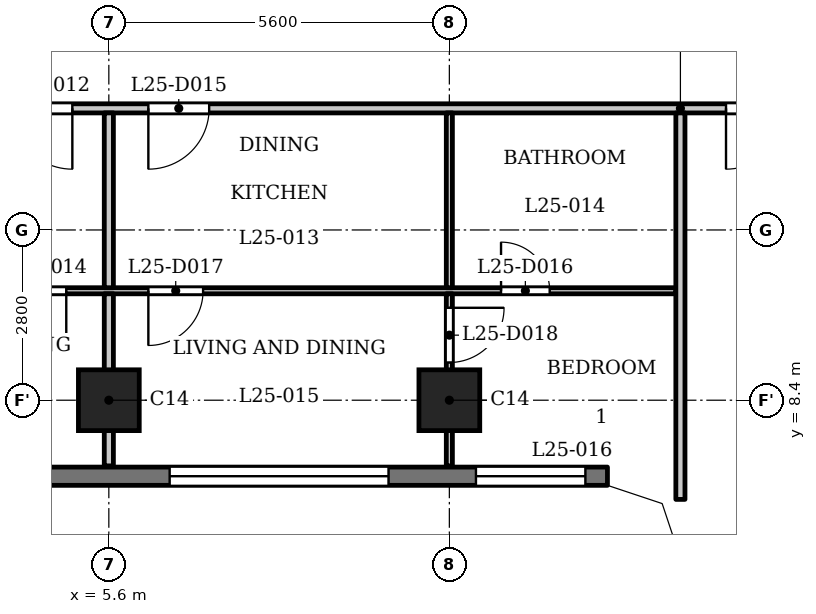
"""IFC4 building model, lengths in metres.
Left out: names, types, materials, properties, quantities, classifications, styles, units other than length and angle.
Written with IfcOpenShell. Run it as: python <this file> out.ifc"""

import sys

from ifc_helpers import new_model, si_unit, direction, frame, frame_2d, origin, origin_2d, place, context, subcontext, project, spatial, polyline, rectangle, outline, extrude, element, fill, save


model = new_model("IFC4")
c1 = context("Model", 3, precision=1e-05, world=origin(), true_north=direction((0.0, 1.0)))
c2 = subcontext(c1, "Body", "Model", "MODEL_VIEW")
j1 = project(units=[si_unit("LENGTHUNIT", "METRE"), si_unit("PLANEANGLEUNIT", "RADIAN")], contexts=[c1])
p1 = place(None, origin())
s1 = spatial("IfcSite", under=j1, at=p1, CompositionType="ELEMENT")
p2 = place(p1, origin())
s2 = spatial("IfcBuilding", under=s1, at=p2, CompositionType="ELEMENT")
p3 = place(p2, frame((0.0, 0.0, 100.8)))
s3 = spatial("IfcBuildingStorey", under=s2, at=p3, CompositionType="ELEMENT", Elevation=100.8)
for number, where, z_axis, x_axis in (
    (1, (5.6, 8.4, 0.0), (0.0, 0.0, 1.0), (1.0, 0.0, 0.0)),
    (2, (11.2, 8.4, 0.0), (0.0, 0.0, 1.0), (1.0, 0.0, 0.0)),
):
    element("IfcColumn", number, at=place(p3, frame(where, z_axis=z_axis, x_axis=x_axis)), inside=s3, PredefinedType="COLUMN", context=c2, shape_type="SweptSolid", body=[
        extrude(rectangle(XDim=1.0, YDim=1.0, at=origin_2d()), origin(), (0.0, 0.0, 1.0), 3.5),
    ])
p4 = place(p3, frame((-13.8, 7.15, 0.0), z_axis=(0.0, 0.0, 1.0), x_axis=(1.0, 0.0, 0.0)))
e3 = element("IfcWall", 3, at=p4, inside=s3, PredefinedType="SOLIDWALL", context=c2, shape_type="SweptSolid", body=[
    extrude(rectangle(XDim=27.6, YDim=0.3, at=frame_2d((13.8, 0.0))), origin(), (0.0, 0.0, 1.0), 3.2),
])
p5 = place(p4, frame((0.363, 0.0, 0.9)))
e4 = element("IfcOpeningElement", 4, at=p5, cuts=e3, PredefinedType="OPENING", context=c2, shape_type="SweptSolid", body=[
    extrude(rectangle(XDim=1.8, YDim=1.25, at=frame_2d((0.9, 0.625))), frame((0.0, 0.16, 0.0), z_axis=(0.0, -1.0, 0.0), x_axis=(1.0, 0.0, 0.0)), (0.0, 0.0, 1.0), 0.32),
])
p6 = place(p4, frame((3.6, 0.0, 1.2)))
e5 = element("IfcOpeningElement", 5, at=p6, cuts=e3, PredefinedType="OPENING", context=c2, shape_type="SweptSolid", body=[
    extrude(rectangle(XDim=3.6, YDim=0.95, at=frame_2d((1.8, 0.475))), frame((0.0, 0.16, 0.0), z_axis=(0.0, -1.0, 0.0), x_axis=(1.0, 0.0, 0.0)), (0.0, 0.0, 1.0), 0.32),
])
p7 = place(p4, frame((9.2, 0.0, 1.2)))
e6 = element("IfcOpeningElement", 6, at=p7, cuts=e3, PredefinedType="OPENING", context=c2, shape_type="SweptSolid", body=[
    extrude(rectangle(XDim=3.6, YDim=0.95, at=frame_2d((1.8, 0.475))), frame((0.0, 0.16, 0.0), z_axis=(0.0, -1.0, 0.0), x_axis=(1.0, 0.0, 0.0)), (0.0, 0.0, 1.0), 0.32),
])
p8 = place(p4, frame((14.8, 0.0, 1.2)))
e7 = element("IfcOpeningElement", 7, at=p8, cuts=e3, PredefinedType="OPENING", context=c2, shape_type="SweptSolid", body=[
    extrude(rectangle(XDim=3.6, YDim=0.95, at=frame_2d((1.8, 0.475))), frame((0.0, 0.16, 0.0), z_axis=(0.0, -1.0, 0.0), x_axis=(1.0, 0.0, 0.0)), (0.0, 0.0, 1.0), 0.32),
])
p9 = place(p4, frame((20.4, 0.0, 1.2)))
e8 = element("IfcOpeningElement", 8, at=p9, cuts=e3, PredefinedType="OPENING", context=c2, shape_type="SweptSolid", body=[
    extrude(rectangle(XDim=3.6, YDim=0.95, at=frame_2d((1.8, 0.475))), frame((0.0, 0.16, 0.0), z_axis=(0.0, -1.0, 0.0), x_axis=(1.0, 0.0, 0.0)), (0.0, 0.0, 1.0), 0.32),
])
p10 = place(p4, frame((25.438, 0.0, 0.9)))
e9 = element("IfcOpeningElement", 9, at=p10, cuts=e3, PredefinedType="OPENING", context=c2, shape_type="SweptSolid", body=[
    extrude(rectangle(XDim=1.8, YDim=1.25, at=frame_2d((0.9, 0.625))), frame((0.0, 0.16, 0.0), z_axis=(0.0, -1.0, 0.0), x_axis=(1.0, 0.0, 0.0)), (0.0, 0.0, 1.0), 0.32),
])
p11 = place(p3, frame((-14.925, 10.2, 0.0), z_axis=(0.0, 0.0, 1.0), x_axis=(1.0, 0.0, 0.0)))
e10 = element("IfcWall", 10, at=p11, inside=s3, PredefinedType="PARTITIONING", context=c2, shape_type="SweptSolid", body=[
    extrude(rectangle(XDim=29.85, YDim=0.1, at=frame_2d((14.925, 0.0))), origin(), (0.0, 0.0, 1.0), 3.2),
])
p12 = place(p11, frame((0.525, 0.0, 0.0)))
e11 = element("IfcOpeningElement", 11, at=p12, cuts=e10, PredefinedType="OPENING", context=c2, shape_type="SweptSolid", body=[
    extrude(rectangle(XDim=0.8, YDim=2.1, at=frame_2d((0.4, 1.05))), frame((0.0, 0.06, 0.0), z_axis=(0.0, -1.0, 0.0), x_axis=(1.0, 0.0, 0.0)), (0.0, 0.0, 1.0), 0.12),
])
p13 = place(p11, frame((4.375, 0.0, 0.0)))
e12 = element("IfcOpeningElement", 12, at=p13, cuts=e10, PredefinedType="OPENING", context=c2, shape_type="SweptSolid", body=[
    extrude(rectangle(XDim=0.9, YDim=2.1, at=frame_2d((0.45, 1.05))), frame((0.0, 0.06, 0.0), z_axis=(0.0, -1.0, 0.0), x_axis=(1.0, 0.0, 0.0)), (0.0, 0.0, 1.0), 0.12),
])
p14 = place(p11, frame((10.125, 0.0, 0.0)))
e13 = element("IfcOpeningElement", 13, at=p14, cuts=e10, PredefinedType="OPENING", context=c2, shape_type="SweptSolid", body=[
    extrude(rectangle(XDim=0.8, YDim=2.1, at=frame_2d((0.4, 1.05))), frame((0.0, 0.06, 0.0), z_axis=(0.0, -1.0, 0.0), x_axis=(1.0, 0.0, 0.0)), (0.0, 0.0, 1.0), 0.12),
])
p15 = place(p11, frame((12.975, 0.0, 0.0)))
e14 = element("IfcOpeningElement", 14, at=p15, cuts=e10, PredefinedType="OPENING", context=c2, shape_type="SweptSolid", body=[
    extrude(rectangle(XDim=0.9, YDim=2.1, at=frame_2d((0.45, 1.05))), frame((0.0, 0.06, 0.0), z_axis=(0.0, -1.0, 0.0), x_axis=(1.0, 0.0, 0.0)), (0.0, 0.0, 1.0), 0.12),
])
p16 = place(p11, frame((16.075, 0.0, 0.0)))
e15 = element("IfcOpeningElement", 15, at=p16, cuts=e10, PredefinedType="OPENING", context=c2, shape_type="SweptSolid", body=[
    extrude(rectangle(XDim=0.8, YDim=2.1, at=frame_2d((0.4, 1.05))), frame((0.0, 0.06, 0.0), z_axis=(0.0, -1.0, 0.0), x_axis=(1.0, 0.0, 0.0)), (0.0, 0.0, 1.0), 0.12),
])
p17 = place(p11, frame((18.925, 0.0, 0.0)))
e16 = element("IfcOpeningElement", 16, at=p17, cuts=e10, PredefinedType="OPENING", context=c2, shape_type="SweptSolid", body=[
    extrude(rectangle(XDim=0.9, YDim=2.1, at=frame_2d((0.45, 1.05))), frame((0.0, 0.06, 0.0), z_axis=(0.0, -1.0, 0.0), x_axis=(1.0, 0.0, 0.0)), (0.0, 0.0, 1.0), 0.12),
])
p18 = place(p11, frame((26.975, 0.0, 0.0)))
e17 = element("IfcOpeningElement", 17, at=p18, cuts=e10, PredefinedType="OPENING", context=c2, shape_type="SweptSolid", body=[
    extrude(rectangle(XDim=0.8, YDim=2.1, at=frame_2d((0.4, 1.05))), frame((0.0, 0.06, 0.0), z_axis=(0.0, -1.0, 0.0), x_axis=(1.0, 0.0, 0.0)), (0.0, 0.0, 1.0), 0.12),
])
p19 = place(p11, frame((21.175, 0.0, 0.0)))
e18 = element("IfcOpeningElement", 18, at=p19, cuts=e10, PredefinedType="OPENING", context=c2, shape_type="SweptSolid", body=[
    extrude(rectangle(XDim=0.9, YDim=2.1, at=frame_2d((0.45, 1.05))), frame((0.0, 0.06, 0.0), z_axis=(0.0, -1.0, 0.0), x_axis=(1.0, 0.0, 0.0)), (0.0, 0.0, 1.0), 0.12),
])
p20 = place(p3, frame((-17.4, 13.2, 0.0), z_axis=(0.0, 0.0, 1.0), x_axis=(1.0, 0.0, 0.0)))
e19 = element("IfcWall", 19, at=p20, inside=s3, PredefinedType="PARTITIONING", context=c2, shape_type="SweptSolid", body=[
    extrude(rectangle(XDim=34.8, YDim=0.15, at=frame_2d((17.4, 0.0))), origin(), (0.0, 0.0, 1.0), 3.2),
])
p21 = place(p20, frame((0.75, 0.0, 0.0)))
e20 = element("IfcOpeningElement", 20, at=p21, cuts=e19, PredefinedType="OPENING", context=c2, shape_type="SweptSolid", body=[
    extrude(rectangle(XDim=1.0, YDim=2.1, at=frame_2d((0.5, 1.05))), frame((0.0, 0.085, 0.0), z_axis=(0.0, -1.0, 0.0), x_axis=(1.0, 0.0, 0.0)), (0.0, 0.0, 1.0), 0.17),
])
p22 = place(p20, frame((33.15, 0.0, 0.0)))
e21 = element("IfcOpeningElement", 21, at=p22, cuts=e19, PredefinedType="OPENING", context=c2, shape_type="SweptSolid", body=[
    extrude(rectangle(XDim=1.0, YDim=2.1, at=frame_2d((0.5, 1.05))), frame((0.0, 0.085, 0.0), z_axis=(0.0, -1.0, 0.0), x_axis=(1.0, 0.0, 0.0)), (0.0, 0.0, 1.0), 0.17),
])
p23 = place(p20, frame((6.85, 0.0, 0.0)))
e22 = element("IfcOpeningElement", 22, at=p23, cuts=e19, PredefinedType="OPENING", context=c2, shape_type="SweptSolid", body=[
    extrude(rectangle(XDim=1.0, YDim=2.1, at=frame_2d((0.5, 1.05))), frame((0.0, 0.085, 0.0), z_axis=(0.0, -1.0, 0.0), x_axis=(1.0, 0.0, 0.0)), (0.0, 0.0, 1.0), 0.17),
])
p24 = place(p20, frame((15.45, 0.0, 0.0)))
e23 = element("IfcOpeningElement", 23, at=p24, cuts=e19, PredefinedType="OPENING", context=c2, shape_type="SweptSolid", body=[
    extrude(rectangle(XDim=1.0, YDim=2.1, at=frame_2d((0.5, 1.05))), frame((0.0, 0.085, 0.0), z_axis=(0.0, -1.0, 0.0), x_axis=(1.0, 0.0, 0.0)), (0.0, 0.0, 1.0), 0.17),
])
p25 = place(p20, frame((21.4, 0.0, 0.0)))
e24 = element("IfcOpeningElement", 24, at=p25, cuts=e19, PredefinedType="OPENING", context=c2, shape_type="SweptSolid", body=[
    extrude(rectangle(XDim=1.0, YDim=2.1, at=frame_2d((0.5, 1.05))), frame((0.0, 0.085, 0.0), z_axis=(0.0, -1.0, 0.0), x_axis=(1.0, 0.0, 0.0)), (0.0, 0.0, 1.0), 0.17),
])
p26 = place(p20, frame((23.65, 0.0, 0.0)))
e25 = element("IfcOpeningElement", 25, at=p26, cuts=e19, PredefinedType="OPENING", context=c2, shape_type="SweptSolid", body=[
    extrude(rectangle(XDim=1.0, YDim=2.1, at=frame_2d((0.5, 1.05))), frame((0.0, 0.085, 0.0), z_axis=(0.0, -1.0, 0.0), x_axis=(1.0, 0.0, 0.0)), (0.0, 0.0, 1.0), 0.17),
])
p27 = place(p3, frame((5.6, 7.32, 0.0), z_axis=(0.0, 0.0, 1.0), x_axis=(0.0, 1.0, 0.0)))
e26 = element("IfcWall", 26, at=p27, inside=s3, PredefinedType="PARTITIONING", context=c2, shape_type="SweptSolid", body=[
    extrude(rectangle(XDim=2.83, YDim=0.15, at=frame_2d((1.415, 0.0))), origin(), (0.0, 0.0, 1.0), 3.2),
])
p28 = place(p3, frame((5.6, 10.25, 0.0), z_axis=(0.0, 0.0, 1.0), x_axis=(0.0, 1.0, 0.0)))
e27 = element("IfcWall", 27, at=p28, inside=s3, PredefinedType="PARTITIONING", context=c2, shape_type="SweptSolid", body=[
    extrude(rectangle(XDim=2.875, YDim=0.15, at=frame_2d((1.438, 0.0))), origin(), (0.0, 0.0, 1.0), 3.2),
])
p29 = place(p3, frame((11.2, 7.32, 0.0), z_axis=(0.0, 0.0, 1.0), x_axis=(0.0, 1.0, 0.0)))
e28 = element("IfcWall", 28, at=p29, inside=s3, PredefinedType="PARTITIONING", context=c2, shape_type="SweptSolid", body=[
    extrude(rectangle(XDim=2.83, YDim=0.1, at=frame_2d((1.415, 0.0))), origin(), (0.0, 0.0, 1.0), 3.2),
])
p30 = place(p29, frame((1.7, 0.0, 0.0)))
e29 = element("IfcOpeningElement", 29, at=p30, cuts=e28, PredefinedType="OPENING", context=c2, shape_type="SweptSolid", body=[
    extrude(rectangle(XDim=0.9, YDim=2.1, at=frame_2d((0.45, 1.05))), frame((0.0, 0.06, 0.0), z_axis=(0.0, -1.0, 0.0), x_axis=(1.0, 0.0, 0.0)), (0.0, 0.0, 1.0), 0.12),
])
p31 = place(p3, frame((11.2, 10.25, 0.0), z_axis=(0.0, 0.0, 1.0), x_axis=(0.0, 1.0, 0.0)))
e30 = element("IfcWall", 30, at=p31, inside=s3, PredefinedType="PARTITIONING", context=c2, shape_type="SweptSolid", body=[
    extrude(rectangle(XDim=2.875, YDim=0.1, at=frame_2d((1.438, 0.0))), origin(), (0.0, 0.0, 1.0), 3.2),
])
p32 = place(p3, frame((15.0, 6.769, 0.0), z_axis=(0.0, 0.0, 1.0), x_axis=(0.0, 1.0, 0.0)))
e31 = element("IfcWall", 31, at=p32, inside=s3, PredefinedType="PARTITIONING", context=c2, shape_type="SweptSolid", body=[
    extrude(rectangle(XDim=6.356, YDim=0.15, at=frame_2d((3.178, 0.0))), origin(), (0.0, 0.0, 1.0), 3.2),
])
p33 = place(p3, origin())
e32 = element("IfcWall", 32, at=p33, inside=s3, PredefinedType="SOLIDWALL", context=c2, shape_type="SweptSolid", body=[
    extrude(outline(polyline([(14.937, 6.937), (13.849, 7.3), (13.8, 7.3), (13.8, 7.0), (14.7, 6.7), (15.0, 5.8), (15.3, 5.8), (15.3, 5.849), (14.937, 6.937)])), origin(), (0.0, 0.0, 1.0), 3.2),
])
p34 = place(p22, origin())
e33 = element("IfcDoor", 33, at=p34, inside=s3, OperationType="SINGLE_SWING_LEFT", PredefinedType="DOOR", context=c2, shape_type="SweptSolid", body=[
    extrude(rectangle(XDim=1.0, YDim=2.1, at=frame_2d((0.5, 1.05))), frame((0.0, 0.025, 0.0), z_axis=(0.0, -1.0, 0.0), x_axis=(1.0, 0.0, 0.0)), (0.0, 0.0, 1.0), 0.05),
])
fill(e21, e33)
p35 = place(p25, origin())
e34 = element("IfcDoor", 34, at=p35, inside=s3, OperationType="SINGLE_SWING_RIGHT", PredefinedType="DOOR", context=c2, shape_type="SweptSolid", body=[
    extrude(rectangle(XDim=1.0, YDim=2.1, at=frame_2d((0.5, 1.05))), frame((0.0, 0.025, 0.0), z_axis=(0.0, -1.0, 0.0), x_axis=(1.0, 0.0, 0.0)), (0.0, 0.0, 1.0), 0.05),
])
fill(e24, e34)
p36 = place(p17, origin())
e35 = element("IfcDoor", 35, at=p36, inside=s3, OperationType="SINGLE_SWING_RIGHT", PredefinedType="DOOR", context=c2, shape_type="SweptSolid", body=[
    extrude(rectangle(XDim=0.9, YDim=2.1, at=frame_2d((0.45, 1.05))), frame((0.0, 0.025, 0.0), z_axis=(0.0, -1.0, 0.0), x_axis=(1.0, 0.0, 0.0)), (0.0, 0.0, 1.0), 0.05),
])
fill(e16, e35)
p37 = place(p26, origin())
e36 = element("IfcDoor", 36, at=p37, inside=s3, OperationType="SINGLE_SWING_LEFT", PredefinedType="DOOR", context=c2, shape_type="SweptSolid", body=[
    extrude(rectangle(XDim=1.0, YDim=2.1, at=frame_2d((0.5, 1.05))), frame((0.0, 0.025, 0.0), z_axis=(0.0, -1.0, 0.0), x_axis=(1.0, 0.0, 0.0)), (0.0, 0.0, 1.0), 0.05),
])
fill(e25, e36)
p38 = place(p18, origin())
e37 = element("IfcDoor", 37, at=p38, inside=s3, OperationType="SINGLE_SWING_RIGHT", PredefinedType="DOOR", context=c2, shape_type="SweptSolid", body=[
    extrude(rectangle(XDim=0.8, YDim=2.1, at=frame_2d((0.4, 1.05))), frame((0.0, 0.025, 0.0), z_axis=(0.0, -1.0, 0.0), x_axis=(1.0, 0.0, 0.0)), (0.0, 0.0, 1.0), 0.05),
])
fill(e17, e37)
p39 = place(p19, origin())
e38 = element("IfcDoor", 38, at=p39, inside=s3, OperationType="SINGLE_SWING_LEFT", PredefinedType="DOOR", context=c2, shape_type="SweptSolid", body=[
    extrude(rectangle(XDim=0.9, YDim=2.1, at=frame_2d((0.45, 1.05))), frame((0.0, 0.025, 0.0), z_axis=(0.0, -1.0, 0.0), x_axis=(1.0, 0.0, 0.0)), (0.0, 0.0, 1.0), 0.05),
])
fill(e18, e38)
p40 = place(p30, origin())
e39 = element("IfcDoor", 39, at=p40, inside=s3, OperationType="SINGLE_SWING_RIGHT", PredefinedType="DOOR", context=c2, shape_type="SweptSolid", body=[
    extrude(rectangle(XDim=0.9, YDim=2.1, at=frame_2d((0.45, 1.05))), frame((0.0, 0.025, 0.0), z_axis=(0.0, -1.0, 0.0), x_axis=(1.0, 0.0, 0.0)), (0.0, 0.0, 1.0), 0.05),
])
fill(e29, e39)
p41 = place(p9, origin())
e40 = element("IfcWindow", 40, at=p41, inside=s3, PartitioningType="SINGLE_PANEL", PredefinedType="WINDOW", context=c2, shape_type="SweptSolid", body=[
    extrude(rectangle(XDim=3.6, YDim=0.95, at=frame_2d((1.8, 0.475))), frame((0.0, 0.03, 0.0), z_axis=(0.0, -1.0, 0.0), x_axis=(1.0, 0.0, 0.0)), (0.0, 0.0, 1.0), 0.06),
])
fill(e8, e40)
p42 = place(p10, origin())
e41 = element("IfcWindow", 41, at=p42, inside=s3, PartitioningType="SINGLE_PANEL", PredefinedType="WINDOW", context=c2, shape_type="SweptSolid", body=[
    extrude(rectangle(XDim=1.8, YDim=1.25, at=frame_2d((0.9, 0.625))), frame((0.0, 0.03, 0.0), z_axis=(0.0, -1.0, 0.0), x_axis=(1.0, 0.0, 0.0)), (0.0, 0.0, 1.0), 0.06),
])
fill(e9, e41)
save(model, sys.argv[1])
